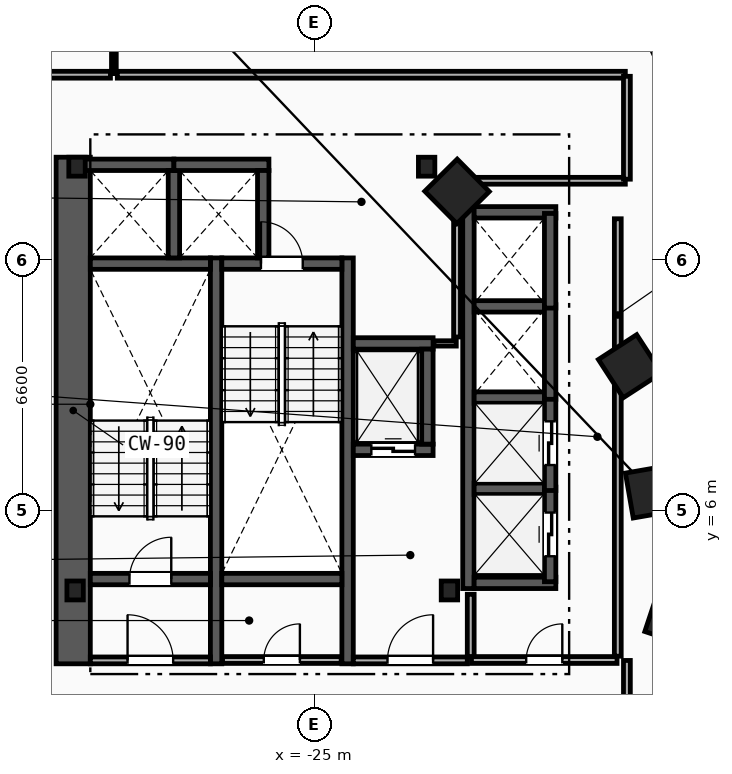
"""IFC4 building model, lengths in metres.
Left out: names, types, materials, properties, quantities, classifications, styles, units other than length and angle.
Written with IfcOpenShell. Run it as: python <this file> out.ifc"""

import sys

from ifc_helpers import new_model, si_unit, direction, frame, frame_2d, origin, origin_2d, place, context, subcontext, project, spatial, rectangle, i_section, extrude, element, fill, save


model = new_model("IFC4")
c1 = context("Model", 3, precision=1e-05, world=origin(), true_north=direction((0.0, 1.0)))
c2 = subcontext(c1, "Body", "Model", "MODEL_VIEW")
j1 = project(units=[si_unit("LENGTHUNIT", "METRE"), si_unit("PLANEANGLEUNIT", "RADIAN")], contexts=[c1])
p1 = place(None, origin())
s1 = spatial("IfcSite", under=j1, at=p1, CompositionType="ELEMENT")
p2 = place(p1, origin())
s2 = spatial("IfcBuilding", under=s1, at=p2, CompositionType="ELEMENT")
p3 = place(p2, frame((0.0, 0.0, 46.8)))
s3 = spatial("IfcBuildingStorey", under=s2, at=p3, CompositionType="ELEMENT", Elevation=46.8)
for number, where, z_axis, x_axis in (
    (1, (-31.3, 3.9, 0.0), (0.0, 0.0, 1.0), (1.0, 0.0, 0.0)),
    (2, (-21.45, 3.9, 0.0), (0.0, 0.0, 1.0), (1.0, 0.0, 0.0)),
    (3, (-22.05, 15.05, 0.0), (0.0, 0.0, 1.0), (1.0, 0.0, 0.0)),
    (4, (-31.25, 15.05, 0.0), (0.0, 0.0, 1.0), (1.0, 0.0, 0.0)),
):
    element("IfcColumn", number, at=place(p3, frame(where, z_axis=z_axis, x_axis=x_axis)), inside=s3, PredefinedType="COLUMN", context=c2, shape_type="SweptSolid", body=[
        extrude(i_section(OverallWidth=0.432, OverallDepth=0.498, WebThickness=0.056, FlangeThickness=0.089, FilletRadius=0.018, at=origin_2d()), origin(), (0.0, 0.0, 1.0), 3.8),
    ])
for number, where, z_axis, x_axis in (
    (5, (-15.55, 3.2, 0.0), (0.0, 0.0, 1.0), (0.315, 0.949, 0.0)),
    (6, (-16.125, 6.5, 0.0), (0.0, 0.0, 1.0), (-0.172, 0.985, 0.0)),
    (7, (-16.7, 9.8, 0.0), (0.0, 0.0, 1.0), (-0.544, 0.839, 0.0)),
    (8, (-21.25, 14.4, 0.0), (0.0, 0.0, 1.0), (-0.703, 0.711, 0.0)),
):
    element("IfcColumn", number, at=place(p3, frame(where, z_axis=z_axis, x_axis=x_axis)), inside=s3, PredefinedType="COLUMN", context=c2, shape_type="SweptSolid", body=[
        extrude(rectangle(XDim=1.2, YDim=1.2, at=origin_2d()), origin(), (0.0, 0.0, 1.0), 3.8),
    ])
p4 = place(p3, frame((-31.35, 1.97, 0.0), z_axis=(0.0, 0.0, 1.0), x_axis=(0.0, 1.0, 0.0)))
e9 = element("IfcWall", 9, at=p4, inside=s3, PredefinedType="SHEAR", context=c2, shape_type="SweptSolid", body=[
    extrude(rectangle(XDim=13.33, YDim=0.9, at=frame_2d((6.665, 0.0))), origin(), (0.0, 0.0, 1.0), 3.5),
])
for number, where, z_axis, x_axis in (
    (10, (-27.59, 1.97, 0.0), (0.0, 0.0, 1.0), (0.0, 1.0, 0.0)),
    (11, (-24.13, 1.97, 0.0), (0.0, 0.0, 1.0), (0.0, 1.0, 0.0)),
):
    element("IfcWall", number, at=place(p3, frame(where, z_axis=z_axis, x_axis=x_axis)), inside=s3, PredefinedType="SHEAR", context=c2, shape_type="SweptSolid", body=[
        extrude(rectangle(XDim=10.68, YDim=0.3, at=frame_2d((5.34, 0.0))), origin(), (0.0, 0.0, 1.0), 3.5),
    ])
p5 = place(p3, frame((-30.9, 4.2, 0.0), z_axis=(0.0, 0.0, 1.0), x_axis=(1.0, 0.0, 0.0)))
e12 = element("IfcWall", 12, at=p5, inside=s3, PredefinedType="SHEAR", context=c2, shape_type="SweptSolid", body=[
    extrude(rectangle(XDim=3.16, YDim=0.3, at=frame_2d((1.58, 0.0))), origin(), (0.0, 0.0, 1.0), 3.5),
])
p6 = place(p5, frame((1.03, 0.0, 0.0)))
e13 = element("IfcOpeningElement", 13, at=p6, cuts=e12, PredefinedType="OPENING", context=c2, shape_type="SweptSolid", body=[
    extrude(rectangle(XDim=1.1, YDim=2.15, at=frame_2d((0.55, 1.075))), frame((0.0, 0.16, 0.0), z_axis=(0.0, -1.0, 0.0), x_axis=(1.0, 0.0, 0.0)), (0.0, 0.0, 1.0), 0.32),
])
p7 = place(p3, frame((-30.9, 12.5, 0.0), z_axis=(0.0, 0.0, 1.0), x_axis=(1.0, 0.0, 0.0)))
e14 = element("IfcWall", 14, at=p7, inside=s3, PredefinedType="SHEAR", context=c2, shape_type="SweptSolid", body=[
    extrude(rectangle(XDim=3.16, YDim=0.3, at=frame_2d((1.58, 0.0))), origin(), (0.0, 0.0, 1.0), 3.5),
])
p8 = place(p3, frame((-27.44, 12.5, 0.0), z_axis=(0.0, 0.0, 1.0), x_axis=(1.0, 0.0, 0.0)))
e15 = element("IfcWall", 15, at=p8, inside=s3, PredefinedType="SHEAR", context=c2, shape_type="SweptSolid", body=[
    extrude(rectangle(XDim=3.16, YDim=0.3, at=frame_2d((1.58, 0.0))), origin(), (0.0, 0.0, 1.0), 3.5),
])
p9 = place(p8, frame((1.03, 0.0, 0.0)))
e16 = element("IfcOpeningElement", 16, at=p9, cuts=e15, PredefinedType="OPENING", context=c2, shape_type="SweptSolid", body=[
    extrude(rectangle(XDim=1.1, YDim=2.15, at=frame_2d((0.55, 1.075))), frame((0.0, 0.16, 0.0), z_axis=(0.0, -1.0, 0.0), x_axis=(1.0, 0.0, 0.0)), (0.0, 0.0, 1.0), 0.32),
])
p10 = place(p3, frame((-27.44, 4.2, 0.0), z_axis=(0.0, 0.0, 1.0), x_axis=(1.0, 0.0, 0.0)))
e17 = element("IfcWall", 17, at=p10, inside=s3, PredefinedType="SHEAR", context=c2, shape_type="SweptSolid", body=[
    extrude(rectangle(XDim=3.16, YDim=0.3, at=frame_2d((1.58, 0.0))), origin(), (0.0, 0.0, 1.0), 3.5),
])
p11 = place(p3, frame((-20.89, 2.15, 0.0), z_axis=(0.0, 0.0, 1.0), x_axis=(0.0, 1.0, 0.0)))
e18 = element("IfcWall", 18, at=p11, inside=s3, PredefinedType="PARTITIONING", context=c2, shape_type="SweptSolid", body=[
    extrude(rectangle(XDim=1.65, YDim=0.18, at=frame_2d((0.825, 0.0))), origin(), (0.0, 0.0, 1.0), 3.5),
])
p12 = place(p3, frame((-23.98, 2.06, 0.0), z_axis=(0.0, 0.0, 1.0), x_axis=(1.0, 0.0, 0.0)))
e19 = element("IfcWall", 19, at=p12, inside=s3, PredefinedType="PARTITIONING", context=c2, shape_type="SweptSolid", body=[
    extrude(rectangle(XDim=3.0, YDim=0.18, at=frame_2d((1.5, 0.0))), origin(), (0.0, 0.0, 1.0), 3.5),
])
p13 = place(p12, frame((0.9, 0.0, 0.0)))
e20 = element("IfcOpeningElement", 20, at=p13, cuts=e19, PredefinedType="OPENING", context=c2, shape_type="SweptSolid", body=[
    extrude(rectangle(XDim=1.2, YDim=2.15, at=frame_2d((0.6, 1.075))), frame((0.0, 0.1, 0.0), z_axis=(0.0, -1.0, 0.0), x_axis=(1.0, 0.0, 0.0)), (0.0, 0.0, 1.0), 0.2),
])
p14 = place(p3, frame((-30.9, 2.06, 0.0), z_axis=(0.0, 0.0, 1.0), x_axis=(1.0, 0.0, 0.0)))
e21 = element("IfcWall", 21, at=p14, inside=s3, PredefinedType="PARTITIONING", context=c2, shape_type="SweptSolid", body=[
    extrude(rectangle(XDim=3.16, YDim=0.18, at=frame_2d((1.58, 0.0))), origin(), (0.0, 0.0, 1.0), 3.5),
])
p15 = place(p14, frame((0.98, 0.0, 0.0)))
e22 = element("IfcOpeningElement", 22, at=p15, cuts=e21, PredefinedType="OPENING", context=c2, shape_type="SweptSolid", body=[
    extrude(rectangle(XDim=1.2, YDim=2.15, at=frame_2d((0.6, 1.075))), frame((0.0, 0.1, 0.0), z_axis=(0.0, -1.0, 0.0), x_axis=(1.0, 0.0, 0.0)), (0.0, 0.0, 1.0), 0.2),
])
p16 = place(p3, frame((-23.98, 7.6, 0.0), z_axis=(0.0, 0.0, 1.0), x_axis=(1.0, 0.0, 0.0)))
e23 = element("IfcWall", 23, at=p16, inside=s3, PredefinedType="SHEAR", context=c2, shape_type="SweptSolid", body=[
    extrude(rectangle(XDim=2.1, YDim=0.3, at=frame_2d((1.05, 0.0))), origin(), (0.0, 0.0, 1.0), 3.5),
])
p17 = place(p16, frame((0.475, 0.0, 0.0)))
e24 = element("IfcOpeningElement", 24, at=p17, cuts=e23, PredefinedType="OPENING", context=c2, shape_type="SweptSolid", body=[
    extrude(rectangle(XDim=1.15, YDim=2.2, at=frame_2d((0.575, 1.1))), frame((0.0, 0.16, 0.0), z_axis=(0.0, -1.0, 0.0), x_axis=(1.0, 0.0, 0.0)), (0.0, 0.0, 1.0), 0.32),
])
p18 = place(p3, frame((-23.98, 10.4, 0.0), z_axis=(0.0, 0.0, 1.0), x_axis=(1.0, 0.0, 0.0)))
e25 = element("IfcWall", 25, at=p18, inside=s3, PredefinedType="SHEAR", context=c2, shape_type="SweptSolid", body=[
    extrude(rectangle(XDim=2.1, YDim=0.3, at=frame_2d((1.05, 0.0))), origin(), (0.0, 0.0, 1.0), 3.5),
])
for number, where, z_axis, x_axis in (
    (26, (-22.03, 7.75, 0.0), (0.0, 0.0, 1.0), (0.0, 1.0, 0.0)),
    (27, (-31.2, 15.1, 0.0), (0.0, 0.0, 1.0), (1.0, 0.0, 0.0)),
):
    element("IfcWall", number, at=place(p3, frame(where, z_axis=z_axis, x_axis=x_axis)), inside=s3, PredefinedType="SHEAR", context=c2, shape_type="SweptSolid", body=[
        extrude(rectangle(XDim=2.5, YDim=0.3, at=frame_2d((1.25, 0.0))), origin(), (0.0, 0.0, 1.0), 3.5),
    ])
p19 = place(p3, frame((-28.7, 12.65, 0.0), z_axis=(0.0, 0.0, 1.0), x_axis=(0.0, 1.0, 0.0)))
e28 = element("IfcWall", 28, at=p19, inside=s3, PredefinedType="SHEAR", context=c2, shape_type="SweptSolid", body=[
    extrude(rectangle(XDim=2.3, YDim=0.3, at=frame_2d((1.15, 0.0))), origin(), (0.0, 0.0, 1.0), 3.5),
])
p20 = place(p3, frame((-28.7, 15.1, 0.0), z_axis=(0.0, 0.0, 1.0), x_axis=(1.0, 0.0, 0.0)))
e29 = element("IfcWall", 29, at=p20, inside=s3, PredefinedType="SHEAR", context=c2, shape_type="SweptSolid", body=[
    extrude(rectangle(XDim=2.5, YDim=0.3, at=frame_2d((1.25, 0.0))), origin(), (0.0, 0.0, 1.0), 3.5),
])
p21 = place(p3, frame((-26.35, 12.65, 0.0), z_axis=(0.0, 0.0, 1.0), x_axis=(0.0, 1.0, 0.0)))
e30 = element("IfcWall", 30, at=p21, inside=s3, PredefinedType="SHEAR", context=c2, shape_type="SweptSolid", body=[
    extrude(rectangle(XDim=2.3, YDim=0.3, at=frame_2d((1.15, 0.0))), origin(), (0.0, 0.0, 1.0), 3.5),
])
p22 = place(p3, frame((-20.95, 3.95, 0.0), z_axis=(0.0, 0.0, 1.0), x_axis=(0.0, 1.0, 0.0)))
e31 = element("IfcWall", 31, at=p22, inside=s3, PredefinedType="SHEAR", context=c2, shape_type="SweptSolid", body=[
    extrude(rectangle(XDim=10.05, YDim=0.3, at=frame_2d((5.025, 0.0))), origin(), (0.0, 0.0, 1.0), 3.5),
])
for number, where, z_axis, x_axis in (
    (32, (-20.8, 4.1, 0.0), (0.0, 0.0, 1.0), (1.0, 0.0, 0.0)),
    (33, (-20.8, 13.85, 0.0), (0.0, 0.0, 1.0), (1.0, 0.0, 0.0)),
):
    element("IfcWall", number, at=place(p3, frame(where, z_axis=z_axis, x_axis=x_axis)), inside=s3, PredefinedType="SHEAR", context=c2, shape_type="SweptSolid", body=[
        extrude(rectangle(XDim=2.15, YDim=0.3, at=frame_2d((1.075, 0.0))), origin(), (0.0, 0.0, 1.0), 3.5),
    ])
for number, where, z_axis, x_axis in (
    (34, (-20.8, 6.575, 0.0), (0.0, 0.0, 1.0), (1.0, 0.0, 0.0)),
    (35, (-20.8, 8.975, 0.0), (0.0, 0.0, 1.0), (1.0, 0.0, 0.0)),
    (36, (-20.8, 11.375, 0.0), (0.0, 0.0, 1.0), (1.0, 0.0, 0.0)),
):
    element("IfcWall", number, at=place(p3, frame(where, z_axis=z_axis, x_axis=x_axis)), inside=s3, PredefinedType="SHEAR", context=c2, shape_type="SweptSolid", body=[
        extrude(rectangle(XDim=1.85, YDim=0.3, at=frame_2d((0.925, 0.0))), origin(), (0.0, 0.0, 1.0), 3.5),
    ])
p23 = place(p3, frame((-18.8, 4.13, 0.0), z_axis=(0.0, 0.0, 1.0), x_axis=(0.0, 1.0, 0.0)))
e37 = element("IfcWall", 37, at=p23, inside=s3, PredefinedType="SHEAR", context=c2, shape_type="SweptSolid", body=[
    extrude(rectangle(XDim=2.49, YDim=0.3, at=frame_2d((1.245, 0.0))), origin(), (0.0, 0.0, 1.0), 3.5),
])
p24 = place(p23, frame((0.67, 0.0, 0.0)))
e38 = element("IfcOpeningElement", 38, at=p24, cuts=e37, PredefinedType="OPENING", context=c2, shape_type="SweptSolid", body=[
    extrude(rectangle(XDim=1.15, YDim=2.2, at=frame_2d((0.575, 1.1))), frame((0.0, 0.16, 0.0), z_axis=(0.0, -1.0, 0.0), x_axis=(1.0, 0.0, 0.0)), (0.0, 0.0, 1.0), 0.32),
])
p25 = place(p3, frame((-18.8, 6.53, 0.0), z_axis=(0.0, 0.0, 1.0), x_axis=(0.0, 1.0, 0.0)))
e39 = element("IfcWall", 39, at=p25, inside=s3, PredefinedType="SHEAR", context=c2, shape_type="SweptSolid", body=[
    extrude(rectangle(XDim=2.49, YDim=0.3, at=frame_2d((1.245, 0.0))), origin(), (0.0, 0.0, 1.0), 3.5),
])
p26 = place(p25, frame((0.67, 0.0, 0.0)))
e40 = element("IfcOpeningElement", 40, at=p26, cuts=e39, PredefinedType="OPENING", context=c2, shape_type="SweptSolid", body=[
    extrude(rectangle(XDim=1.15, YDim=2.2, at=frame_2d((0.575, 1.1))), frame((0.0, 0.16, 0.0), z_axis=(0.0, -1.0, 0.0), x_axis=(1.0, 0.0, 0.0)), (0.0, 0.0, 1.0), 0.32),
])
for number, where, z_axis, x_axis in (
    (41, (-18.8, 8.93, 0.0), (0.0, 0.0, 1.0), (0.0, 1.0, 0.0)),
    (42, (-18.8, 11.33, 0.0), (0.0, 0.0, 1.0), (0.0, 1.0, 0.0)),
):
    element("IfcWall", number, at=place(p3, frame(where, z_axis=z_axis, x_axis=x_axis)), inside=s3, PredefinedType="SHEAR", context=c2, shape_type="SweptSolid", body=[
        extrude(rectangle(XDim=2.49, YDim=0.3, at=frame_2d((1.245, 0.0))), origin(), (0.0, 0.0, 1.0), 3.5),
    ])
p27 = place(p3, frame((-17.02, 2.17, 0.0), z_axis=(0.0, 0.0, 1.0), x_axis=(0.0, 1.0, 0.0)))
e43 = element("IfcWall", 43, at=p27, inside=s3, PredefinedType="PARTITIONING", context=c2, shape_type="SweptSolid", body=[
    extrude(rectangle(XDim=11.51, YDim=0.18, at=frame_2d((5.755, 0.0))), origin(), (0.0, 0.0, 1.0), 3.5),
])
p28 = place(p3, frame((-20.87, 2.07, 0.0), z_axis=(0.0, 0.0, 1.0), x_axis=(1.0, 0.0, 0.0)))
e44 = element("IfcWall", 44, at=p28, inside=s3, PredefinedType="PARTITIONING", context=c2, shape_type="SweptSolid", body=[
    extrude(rectangle(XDim=3.83, YDim=0.18, at=frame_2d((1.915, 0.0))), origin(), (0.0, 0.0, 1.0), 3.5),
])
p29 = place(p28, frame((1.44, 0.0, 0.0)))
e45 = element("IfcOpeningElement", 45, at=p29, cuts=e44, PredefinedType="OPENING", context=c2, shape_type="SweptSolid", body=[
    extrude(rectangle(XDim=0.95, YDim=2.1, at=frame_2d((0.475, 1.05))), frame((0.0, 0.1, 0.0), z_axis=(0.0, -1.0, 0.0), x_axis=(1.0, 0.0, 0.0)), (0.0, 0.0, 1.0), 0.2),
])
p30 = place(p3, frame((-21.86, 10.4, 0.0), z_axis=(0.0, 0.0, 1.0), x_axis=(1.0, 0.0, 0.0)))
e46 = element("IfcWall", 46, at=p30, inside=s3, PredefinedType="PARTITIONING", context=c2, shape_type="SweptSolid", body=[
    extrude(rectangle(XDim=0.59, YDim=0.14, at=frame_2d((0.295, 0.0))), origin(), (0.0, 0.0, 1.0), 3.5),
])
p31 = place(p3, frame((-21.25, 10.57, 0.0), z_axis=(0.0, 0.0, 1.0), x_axis=(0.0, 1.0, 0.0)))
e47 = element("IfcWall", 47, at=p31, inside=s3, PredefinedType="PARTITIONING", context=c2, shape_type="SweptSolid", body=[
    extrude(rectangle(XDim=4.36, YDim=0.18, at=frame_2d((2.18, 0.0))), origin(), (0.0, 0.0, 1.0), 3.5),
])
p32 = place(p3, frame((-27.42, 2.07, 0.0), z_axis=(0.0, 0.0, 1.0), x_axis=(1.0, 0.0, 0.0)))
e48 = element("IfcWall", 48, at=p32, inside=s3, PredefinedType="PARTITIONING", context=c2, shape_type="SweptSolid", body=[
    extrude(rectangle(XDim=3.12, YDim=0.18, at=frame_2d((1.56, 0.0))), origin(), (0.0, 0.0, 1.0), 3.5),
])
p33 = place(p32, frame((1.085, 0.0, 0.0)))
e49 = element("IfcOpeningElement", 49, at=p33, cuts=e48, PredefinedType="OPENING", context=c2, shape_type="SweptSolid", body=[
    extrude(rectangle(XDim=0.95, YDim=2.1, at=frame_2d((0.475, 1.05))), frame((0.0, 0.1, 0.0), z_axis=(0.0, -1.0, 0.0), x_axis=(1.0, 0.0, 0.0)), (0.0, 0.0, 1.0), 0.2),
])
p34 = place(p3, frame((-30.28, 17.5, 0.0), z_axis=(0.0, 0.0, 1.0), x_axis=(0.0, 1.0, 0.0)))
e50 = element("IfcWall", 50, at=p34, inside=s3, PredefinedType="PARTITIONING", context=c2, shape_type="SweptSolid", body=[
    extrude(rectangle(XDim=8.485, YDim=0.125, at=frame_2d((4.243, 0.0))), origin(), (0.0, 0.0, 1.0), 3.5),
])
p35 = place(p3, frame((-16.822, 17.47, 0.0), z_axis=(0.0, 0.0, 1.0), x_axis=(-1.0, 0.0, 0.0)))
e51 = element("IfcWall", 51, at=p35, inside=s3, PredefinedType="PARTITIONING", context=c2, shape_type="SweptSolid", body=[
    extrude(rectangle(XDim=13.368, YDim=0.18, at=frame_2d((6.684, 0.0))), origin(), (0.0, 0.0, 1.0), 3.5),
])
p36 = place(p3, frame((-21.178, 14.68, 0.0), z_axis=(0.0, 0.0, 1.0), x_axis=(1.0, 0.0, 0.0)))
e52 = element("IfcWall", 52, at=p36, inside=s3, PredefinedType="PARTITIONING", context=c2, shape_type="SweptSolid", body=[
    extrude(rectangle(XDim=4.357, YDim=0.18, at=frame_2d((2.178, 0.0))), origin(), (0.0, 0.0, 1.0), 3.5),
])
p37 = place(p3, frame((-16.78, 14.721, 0.0), z_axis=(0.0, 0.0, 1.0), x_axis=(0.0, 1.0, 0.0)))
e53 = element("IfcWall", 53, at=p37, inside=s3, PredefinedType="PARTITIONING", context=c2, shape_type="SweptSolid", body=[
    extrude(rectangle(XDim=2.707, YDim=0.18, at=frame_2d((1.354, 0.0))), origin(), (0.0, 0.0, 1.0), 3.5),
])
p38 = place(p3, frame((-16.78, -0.329, 0.0), z_axis=(0.0, 0.0, 1.0), x_axis=(0.0, 1.0, 0.0)))
e54 = element("IfcWall", 54, at=p38, inside=s3, PredefinedType="PARTITIONING", context=c2, shape_type="SweptSolid", body=[
    extrude(rectangle(XDim=2.387, YDim=0.18, at=frame_2d((1.194, 0.0))), origin(), (0.0, 0.0, 1.0), 3.5),
])
p39 = place(p3, frame((-30.37, 17.47, 0.0), z_axis=(0.0, 0.0, 1.0), x_axis=(-1.0, 0.0, 0.0)))
e55 = element("IfcWall", 55, at=p39, inside=s3, PredefinedType="PARTITIONING", context=c2, shape_type="SweptSolid", body=[
    extrude(rectangle(XDim=3.258, YDim=0.18, at=frame_2d((1.629, 0.0))), origin(), (0.0, 0.0, 1.0), 3.5),
])
p40 = place(p6, origin())
e56 = element("IfcDoor", 56, at=p40, inside=s3, OperationType="SINGLE_SWING_RIGHT", PredefinedType="DOOR", context=c2, shape_type="SweptSolid", body=[
    extrude(rectangle(XDim=1.1, YDim=2.15, at=frame_2d((0.55, 1.075))), frame((0.0, 0.025, 0.0), z_axis=(0.0, -1.0, 0.0), x_axis=(1.0, 0.0, 0.0)), (0.0, 0.0, 1.0), 0.05),
])
fill(e13, e56)
p41 = place(p9, origin())
e57 = element("IfcDoor", 57, at=p41, inside=s3, OperationType="SINGLE_SWING_LEFT", PredefinedType="DOOR", context=c2, shape_type="SweptSolid", body=[
    extrude(rectangle(XDim=1.1, YDim=2.15, at=frame_2d((0.55, 1.075))), frame((0.0, 0.025, 0.0), z_axis=(0.0, -1.0, 0.0), x_axis=(1.0, 0.0, 0.0)), (0.0, 0.0, 1.0), 0.05),
])
fill(e16, e57)
p42 = place(p13, origin())
e58 = element("IfcDoor", 58, at=p42, inside=s3, OperationType="SINGLE_SWING_RIGHT", PredefinedType="DOOR", context=c2, shape_type="SweptSolid", body=[
    extrude(rectangle(XDim=1.2, YDim=2.15, at=frame_2d((0.6, 1.075))), frame((0.0, 0.025, 0.0), z_axis=(0.0, -1.0, 0.0), x_axis=(1.0, 0.0, 0.0)), (0.0, 0.0, 1.0), 0.05),
])
fill(e20, e58)
p43 = place(p15, origin())
e59 = element("IfcDoor", 59, at=p43, inside=s3, OperationType="SINGLE_SWING_LEFT", PredefinedType="DOOR", context=c2, shape_type="SweptSolid", body=[
    extrude(rectangle(XDim=1.2, YDim=2.15, at=frame_2d((0.6, 1.075))), frame((0.0, 0.025, 0.0), z_axis=(0.0, -1.0, 0.0), x_axis=(1.0, 0.0, 0.0)), (0.0, 0.0, 1.0), 0.05),
])
fill(e22, e59)
p44 = place(p17, origin())
e60 = element("IfcDoor", 60, at=p44, inside=s3, OperationType="SLIDING_TO_LEFT", PredefinedType="TRAPDOOR", context=c2, shape_type="SweptSolid", body=[
    extrude(rectangle(XDim=1.15, YDim=2.2, at=frame_2d((0.575, 1.1))), frame((0.0, 0.025, 0.0), z_axis=(0.0, -1.0, 0.0), x_axis=(1.0, 0.0, 0.0)), (0.0, 0.0, 1.0), 0.05),
])
fill(e24, e60)
p45 = place(p24, origin())
e61 = element("IfcDoor", 61, at=p45, inside=s3, OperationType="SLIDING_TO_LEFT", PredefinedType="TRAPDOOR", context=c2, shape_type="SweptSolid", body=[
    extrude(rectangle(XDim=1.15, YDim=2.2, at=frame_2d((0.575, 1.1))), frame((0.0, 0.025, 0.0), z_axis=(0.0, -1.0, 0.0), x_axis=(1.0, 0.0, 0.0)), (0.0, 0.0, 1.0), 0.05),
])
fill(e38, e61)
p46 = place(p26, origin())
e62 = element("IfcDoor", 62, at=p46, inside=s3, OperationType="SLIDING_TO_LEFT", PredefinedType="TRAPDOOR", context=c2, shape_type="SweptSolid", body=[
    extrude(rectangle(XDim=1.15, YDim=2.2, at=frame_2d((0.575, 1.1))), frame((0.0, 0.025, 0.0), z_axis=(0.0, -1.0, 0.0), x_axis=(1.0, 0.0, 0.0)), (0.0, 0.0, 1.0), 0.05),
])
fill(e40, e62)
p47 = place(p29, origin())
e63 = element("IfcDoor", 63, at=p47, inside=s3, OperationType="SINGLE_SWING_RIGHT", PredefinedType="DOOR", context=c2, shape_type="SweptSolid", body=[
    extrude(rectangle(XDim=0.95, YDim=2.1, at=frame_2d((0.475, 1.05))), frame((0.0, 0.025, 0.0), z_axis=(0.0, -1.0, 0.0), x_axis=(1.0, 0.0, 0.0)), (0.0, 0.0, 1.0), 0.05),
])
fill(e45, e63)
p48 = place(p33, origin())
e64 = element("IfcDoor", 64, at=p48, inside=s3, OperationType="SINGLE_SWING_RIGHT", PredefinedType="DOOR", context=c2, shape_type="SweptSolid", body=[
    extrude(rectangle(XDim=0.95, YDim=2.1, at=frame_2d((0.475, 1.05))), frame((0.0, 0.025, 0.0), z_axis=(0.0, -1.0, 0.0), x_axis=(1.0, 0.0, 0.0)), (0.0, 0.0, 1.0), 0.05),
])
fill(e49, e64)
save(model, sys.argv[1])
